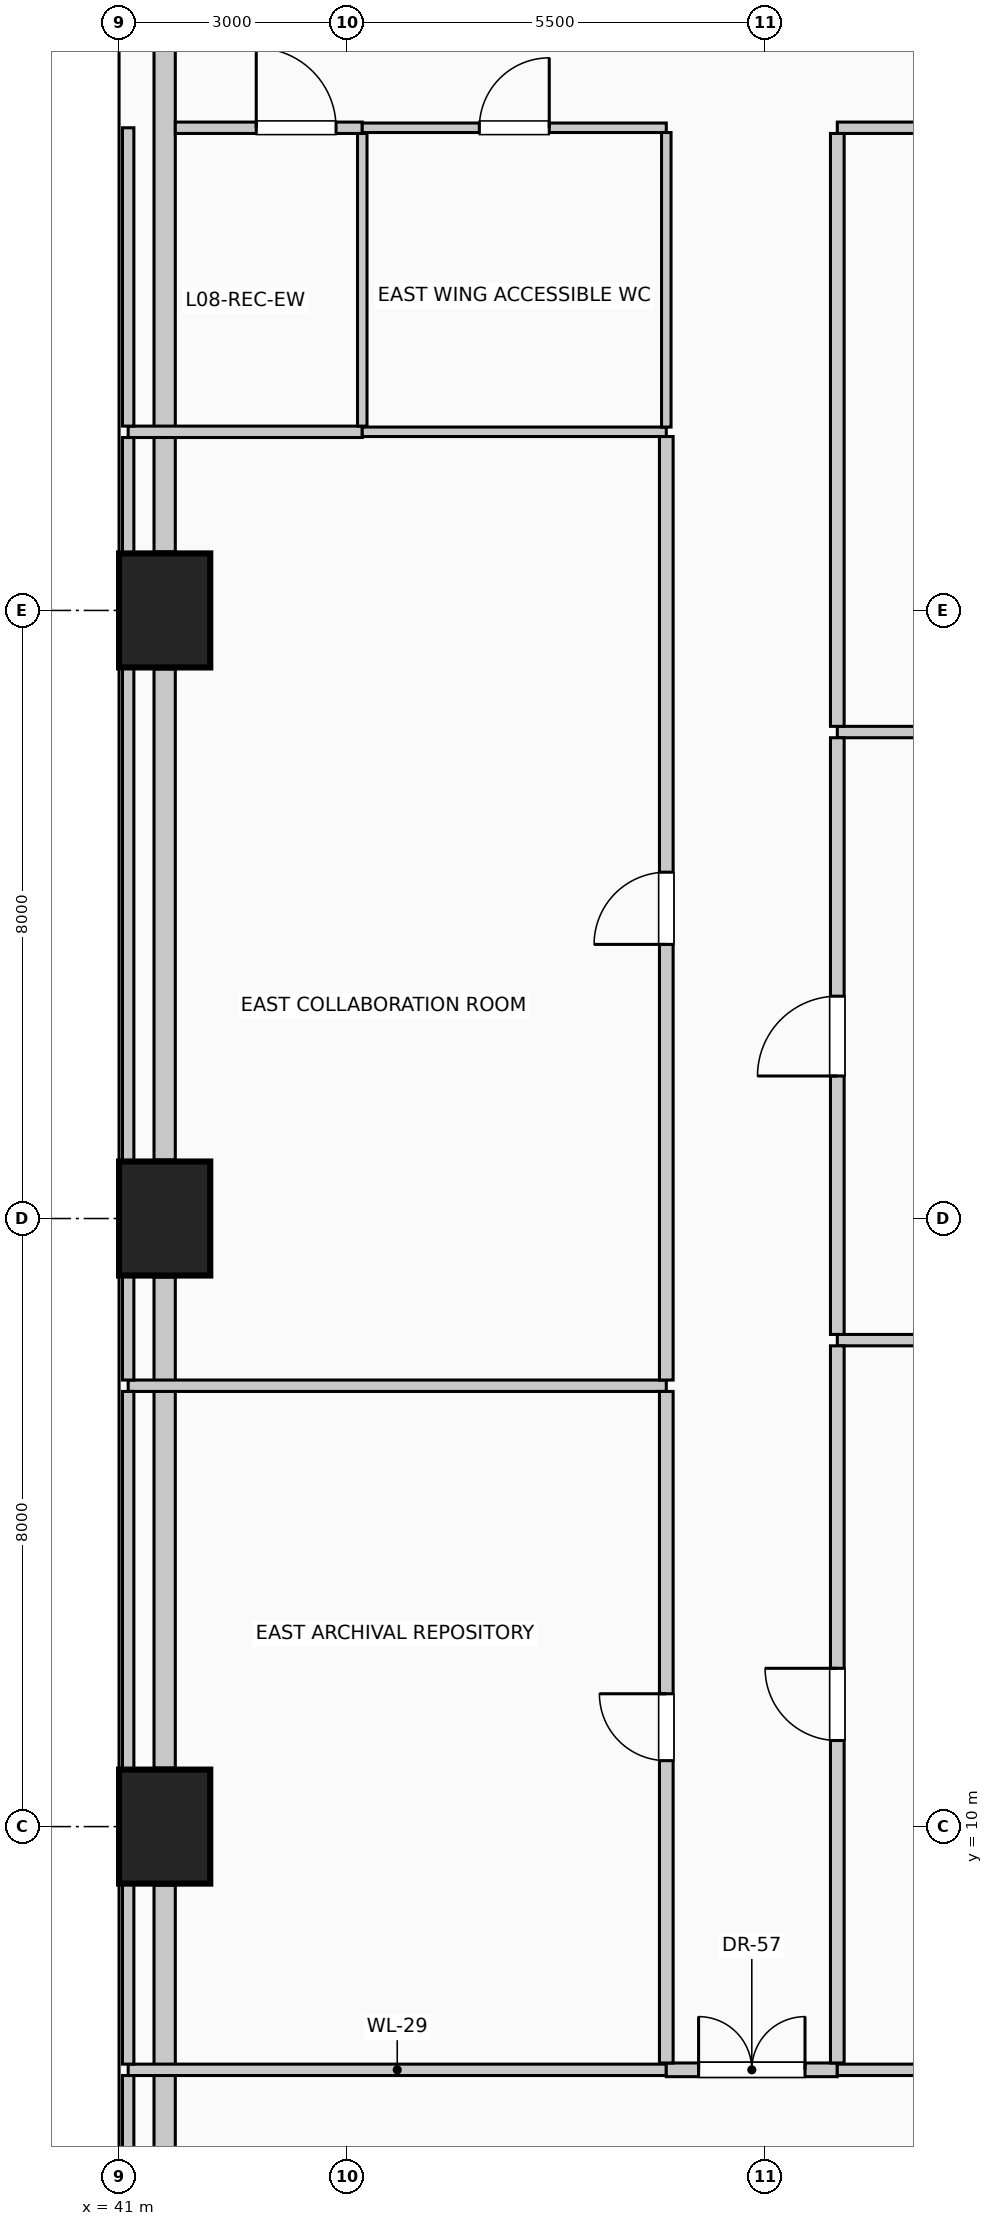
"""IFC4 building model, lengths in metres.
Left out: names, types, materials, properties, quantities, classifications, styles, units other than length and angle.
Written with IfcOpenShell. Run it as: python <this file> out.ifc"""

import sys

from ifc_helpers import new_model, si_unit, direction, frame, frame_2d, origin, origin_2d, place, context, subcontext, project, spatial, rectangle, extrude, element, fill, save


model = new_model("IFC4")
c1 = context("Model", 3, precision=1e-05, world=origin(), true_north=direction((0.0, 1.0)))
c2 = subcontext(c1, "Body", "Model", "MODEL_VIEW")
j1 = project(units=[si_unit("LENGTHUNIT", "METRE"), si_unit("PLANEANGLEUNIT", "RADIAN")], contexts=[c1])
p1 = place(None, origin())
s1 = spatial("IfcSite", under=j1, at=p1, CompositionType="ELEMENT")
p2 = place(p1, origin())
s2 = spatial("IfcBuilding", under=s1, at=p2, CompositionType="ELEMENT")
p3 = place(p2, frame((0.0, 0.0, 34.6)))
s3 = spatial("IfcBuildingStorey", under=s2, at=p3, CompositionType="ELEMENT", Elevation=34.6)
for number, where, z_axis, x_axis in (
    (1, (41.6, 10.0, 0.0), (0.0, 0.0, 1.0), (1.0, 0.0, 0.0)),
    (2, (41.6, 18.0, 0.0), (0.0, 0.0, 1.0), (1.0, 0.0, 0.0)),
    (3, (41.6, 26.0, 0.0), (0.0, 0.0, 1.0), (1.0, 0.0, 0.0)),
):
    element("IfcColumn", number, at=place(p3, frame(where, z_axis=z_axis, x_axis=x_axis)), inside=s3, PredefinedType="COLUMN", context=c2, shape_type="SweptSolid", body=[
        extrude(rectangle(XDim=1.2, YDim=1.5, at=origin_2d()), origin(), (0.0, 0.0, 1.0), 4.0),
    ])
p4 = place(p3, frame((41.6, 1.37, 0.0), z_axis=(0.0, 0.0, 1.0), x_axis=(0.0, 1.0, 0.0)))
e4 = element("IfcWall", 4, at=p4, inside=s3, PredefinedType="SOLIDWALL", context=c2, shape_type="SweptSolid", body=[
    extrude(rectangle(XDim=7.86, YDim=0.28, at=frame_2d((3.93, 0.0))), origin(), (0.0, 0.0, 1.0), 3.0),
])
p5 = place(p4, frame((1.153, 0.0, 0.42)))
e5 = element("IfcOpeningElement", 5, at=p5, cuts=e4, PredefinedType="OPENING", context=c2, shape_type="SweptSolid", body=[
    extrude(rectangle(XDim=2.2, YDim=1.95, at=frame_2d((1.1, 0.975))), frame((0.0, 0.15, 0.0), z_axis=(0.0, -1.0, 0.0), x_axis=(1.0, 0.0, 0.0)), (0.0, 0.0, 1.0), 0.3),
])
for number, where, z_axis, x_axis in (
    (6, (41.6, 10.77, 0.0), (0.0, 0.0, 1.0), (0.0, 1.0, 0.0)),
    (7, (41.6, 18.77, 0.0), (0.0, 0.0, 1.0), (0.0, 1.0, 0.0)),
):
    element("IfcWall", number, at=place(p3, frame(where, z_axis=z_axis, x_axis=x_axis)), inside=s3, PredefinedType="SOLIDWALL", context=c2, shape_type="SweptSolid", body=[
        extrude(rectangle(XDim=6.46, YDim=0.28, at=frame_2d((3.23, 0.0))), origin(), (0.0, 0.0, 1.0), 3.0),
    ])
p6 = place(p3, frame((41.6, 26.77, 0.0), z_axis=(0.0, 0.0, 1.0), x_axis=(0.0, 1.0, 0.0)))
e8 = element("IfcWall", 8, at=p6, inside=s3, PredefinedType="SOLIDWALL", context=c2, shape_type="SweptSolid", body=[
    extrude(rectangle(XDim=6.71, YDim=0.28, at=frame_2d((3.355, 0.0))), origin(), (0.0, 0.0, 1.0), 3.0),
])
p7 = place(p3, frame((41.12, 6.8, 0.0), z_axis=(0.0, 0.0, 1.0), x_axis=(1.0, 0.0, 0.0)))
e9 = element("IfcWall", 9, at=p7, inside=s3, PredefinedType="PARTITIONING", context=c2, shape_type="SweptSolid", body=[
    extrude(rectangle(XDim=7.08, YDim=0.15, at=frame_2d((3.54, 0.0))), origin(), (0.0, 0.0, 1.0), 3.095),
])
p8 = place(p3, frame((48.2, 6.8, 0.0), z_axis=(0.0, 0.0, 1.0), x_axis=(1.0, 0.0, 0.0)))
e10 = element("IfcWall", 10, at=p8, inside=s3, PredefinedType="PARTITIONING", context=c2, shape_type="SweptSolid", body=[
    extrude(rectangle(XDim=2.25, YDim=0.18, at=frame_2d((1.125, 0.0))), origin(), (0.0, 0.0, 1.0), 3.095),
])
p9 = place(p8, frame((0.425, 0.0, 0.0)))
e11 = element("IfcOpeningElement", 11, at=p9, cuts=e10, PredefinedType="OPENING", context=c2, shape_type="SweptSolid", body=[
    extrude(rectangle(XDim=1.4, YDim=2.2, at=frame_2d((0.7, 1.1))), frame((0.0, 0.1, 0.0), z_axis=(0.0, -1.0, 0.0), x_axis=(1.0, 0.0, 0.0)), (0.0, 0.0, 1.0), 0.2),
])
p10 = place(p3, frame((50.45, 6.8, 0.0), z_axis=(0.0, 0.0, 1.0), x_axis=(1.0, 0.0, 0.0)))
e12 = element("IfcWall", 12, at=p10, inside=s3, PredefinedType="PARTITIONING", context=c2, shape_type="SweptSolid", body=[
    extrude(rectangle(XDim=6.81, YDim=0.15, at=frame_2d((3.405, 0.0))), origin(), (0.0, 0.0, 1.0), 3.095),
])
p11 = place(p3, frame((41.12, 15.8, 0.0), z_axis=(0.0, 0.0, 1.0), x_axis=(1.0, 0.0, 0.0)))
e13 = element("IfcWall", 13, at=p11, inside=s3, PredefinedType="PARTITIONING", context=c2, shape_type="SweptSolid", body=[
    extrude(rectangle(XDim=7.08, YDim=0.15, at=frame_2d((3.54, 0.0))), origin(), (0.0, 0.0, 1.0), 3.7),
])
for number, where, z_axis, x_axis in (
    (14, (50.45, 16.4, 0.0), (0.0, 0.0, 1.0), (1.0, 0.0, 0.0)),
    (15, (50.45, 24.4, 0.0), (0.0, 0.0, 1.0), (1.0, 0.0, 0.0)),
):
    element("IfcWall", number, at=place(p3, frame(where, z_axis=z_axis, x_axis=x_axis)), inside=s3, PredefinedType="PARTITIONING", context=c2, shape_type="SweptSolid", body=[
        extrude(rectangle(XDim=6.81, YDim=0.15, at=frame_2d((3.405, 0.0))), origin(), (0.0, 0.0, 1.0), 3.7),
    ])
p12 = place(p3, frame((41.12, 28.35, 0.0), z_axis=(0.0, 0.0, 1.0), x_axis=(1.0, 0.0, 0.0)))
e16 = element("IfcWall", 16, at=p12, inside=s3, PredefinedType="PARTITIONING", context=c2, shape_type="SweptSolid", body=[
    extrude(rectangle(XDim=3.08, YDim=0.15, at=frame_2d((1.54, 0.0))), origin(), (0.0, 0.0, 1.0), 3.7),
])
p13 = place(p3, frame((44.2, 28.35, 0.0), z_axis=(0.0, 0.0, 1.0), x_axis=(1.0, 0.0, 0.0)))
e17 = element("IfcWall", 17, at=p13, inside=s3, PredefinedType="PARTITIONING", context=c2, shape_type="SweptSolid", body=[
    extrude(rectangle(XDim=4.0, YDim=0.125, at=frame_2d((2.0, 0.0))), origin(), (0.0, 0.0, 1.0), 3.7),
])
p14 = place(p3, frame((41.74, 32.35, 0.0), z_axis=(0.0, 0.0, 1.0), x_axis=(1.0, 0.0, 0.0)))
e18 = element("IfcWall", 18, at=p14, inside=s3, PredefinedType="PARTITIONING", context=c2, shape_type="SweptSolid", body=[
    extrude(rectangle(XDim=2.46, YDim=0.15, at=frame_2d((1.23, 0.0))), origin(), (0.0, 0.0, 1.0), 3.7),
])
p15 = place(p14, frame((1.065, 0.0, 0.0)))
e19 = element("IfcOpeningElement", 19, at=p15, cuts=e18, PredefinedType="OPENING", context=c2, shape_type="SweptSolid", body=[
    extrude(rectangle(XDim=1.05, YDim=2.15, at=frame_2d((0.525, 1.075))), frame((0.0, 0.085, 0.0), z_axis=(0.0, -1.0, 0.0), x_axis=(1.0, 0.0, 0.0)), (0.0, 0.0, 1.0), 0.17),
])
p16 = place(p3, frame((44.2, 32.35, 0.0), z_axis=(0.0, 0.0, 1.0), x_axis=(1.0, 0.0, 0.0)))
e20 = element("IfcWall", 20, at=p16, inside=s3, PredefinedType="PARTITIONING", context=c2, shape_type="SweptSolid", body=[
    extrude(rectangle(XDim=4.0, YDim=0.125, at=frame_2d((2.0, 0.0))), origin(), (0.0, 0.0, 1.0), 3.7),
])
p17 = place(p16, frame((1.54, 0.0, 0.0)))
e21 = element("IfcOpeningElement", 21, at=p17, cuts=e20, PredefinedType="OPENING", context=c2, shape_type="SweptSolid", body=[
    extrude(rectangle(XDim=0.92, YDim=2.1, at=frame_2d((0.46, 1.05))), frame((0.0, 0.073, 0.0), z_axis=(0.0, -1.0, 0.0), x_axis=(1.0, 0.0, 0.0)), (0.0, 0.0, 1.0), 0.145),
])
p18 = place(p3, frame((50.45, 32.35, 0.0), z_axis=(0.0, 0.0, 1.0), x_axis=(1.0, 0.0, 0.0)))
e22 = element("IfcWall", 22, at=p18, inside=s3, PredefinedType="PARTITIONING", context=c2, shape_type="SweptSolid", body=[
    extrude(rectangle(XDim=4.0, YDim=0.15, at=frame_2d((2.0, 0.0))), origin(), (0.0, 0.0, 1.0), 3.7),
])
p19 = place(p18, frame((1.475, 0.0, 0.0)))
e23 = element("IfcOpeningElement", 23, at=p19, cuts=e22, PredefinedType="OPENING", context=c2, shape_type="SweptSolid", body=[
    extrude(rectangle(XDim=1.05, YDim=2.15, at=frame_2d((0.525, 1.075))), frame((0.0, 0.085, 0.0), z_axis=(0.0, -1.0, 0.0), x_axis=(1.0, 0.0, 0.0)), (0.0, 0.0, 1.0), 0.17),
])
p20 = place(p3, frame((41.12, 1.35, 0.0), z_axis=(0.0, 0.0, 1.0), x_axis=(0.0, 1.0, 0.0)))
e24 = element("IfcWall", 24, at=p20, inside=s3, PredefinedType="PARTITIONING", context=c2, shape_type="SweptSolid", body=[
    extrude(rectangle(XDim=5.375, YDim=0.15, at=frame_2d((2.688, 0.0))), origin(), (0.0, 0.0, 1.0), 3.7),
])
p21 = place(p3, frame((41.12, 6.875, 0.0), z_axis=(0.0, 0.0, 1.0), x_axis=(0.0, 1.0, 0.0)))
e25 = element("IfcWall", 25, at=p21, inside=s3, PredefinedType="PARTITIONING", context=c2, shape_type="SweptSolid", body=[
    extrude(rectangle(XDim=2.375, YDim=0.15, at=frame_2d((1.188, 0.0))), origin(), (0.0, 0.0, 1.0), 3.7),
])
p22 = place(p3, frame((41.12, 10.75, 0.0), z_axis=(0.0, 0.0, 1.0), x_axis=(0.0, 1.0, 0.0)))
e26 = element("IfcWall", 26, at=p22, inside=s3, PredefinedType="PARTITIONING", context=c2, shape_type="SweptSolid", body=[
    extrude(rectangle(XDim=4.975, YDim=0.15, at=frame_2d((2.488, 0.0))), origin(), (0.0, 0.0, 1.0), 3.7),
])
p23 = place(p3, frame((41.12, 15.875, 0.0), z_axis=(0.0, 0.0, 1.0), x_axis=(0.0, 1.0, 0.0)))
e27 = element("IfcWall", 27, at=p23, inside=s3, PredefinedType="PARTITIONING", context=c2, shape_type="SweptSolid", body=[
    extrude(rectangle(XDim=1.375, YDim=0.15, at=frame_2d((0.688, 0.0))), origin(), (0.0, 0.0, 1.0), 3.7),
])
p24 = place(p3, frame((41.12, 18.75, 0.0), z_axis=(0.0, 0.0, 1.0), x_axis=(0.0, 1.0, 0.0)))
e28 = element("IfcWall", 28, at=p24, inside=s3, PredefinedType="PARTITIONING", context=c2, shape_type="SweptSolid", body=[
    extrude(rectangle(XDim=6.5, YDim=0.15, at=frame_2d((3.25, 0.0))), origin(), (0.0, 0.0, 1.0), 3.7),
])
p25 = place(p3, frame((41.12, 26.75, 0.0), z_axis=(0.0, 0.0, 1.0), x_axis=(0.0, 1.0, 0.0)))
e29 = element("IfcWall", 29, at=p25, inside=s3, PredefinedType="PARTITIONING", context=c2, shape_type="SweptSolid", body=[
    extrude(rectangle(XDim=1.525, YDim=0.15, at=frame_2d((0.762, 0.0))), origin(), (0.0, 0.0, 1.0), 3.7),
])
p26 = place(p3, frame((41.12, 28.425, 0.0), z_axis=(0.0, 0.0, 1.0), x_axis=(0.0, 1.0, 0.0)))
e30 = element("IfcWall", 30, at=p26, inside=s3, PredefinedType="PARTITIONING", context=c2, shape_type="SweptSolid", body=[
    extrude(rectangle(XDim=3.925, YDim=0.15, at=frame_2d((1.962, 0.0))), origin(), (0.0, 0.0, 1.0), 3.7),
])
p27 = place(p3, frame((44.2, 28.425, 0.0), z_axis=(0.0, 0.0, 1.0), x_axis=(0.0, 1.0, 0.0)))
e31 = element("IfcWall", 31, at=p27, inside=s3, PredefinedType="PARTITIONING", context=c2, shape_type="SweptSolid", body=[
    extrude(rectangle(XDim=3.85, YDim=0.125, at=frame_2d((1.925, 0.0))), origin(), (0.0, 0.0, 1.0), 3.7),
])
p28 = place(p3, frame((48.2, 6.89, 0.0), z_axis=(0.0, 0.0, 1.0), x_axis=(0.0, 1.0, 0.0)))
e32 = element("IfcWall", 32, at=p28, inside=s3, PredefinedType="PARTITIONING", context=c2, shape_type="SweptSolid", body=[
    extrude(rectangle(XDim=8.835, YDim=0.18, at=frame_2d((4.417, 0.0))), origin(), (0.0, 0.0, 1.0), 3.7),
])
p29 = place(p28, frame((3.978, 0.0, 0.0)))
e33 = element("IfcOpeningElement", 33, at=p29, cuts=e32, PredefinedType="OPENING", context=c2, shape_type="SweptSolid", body=[
    extrude(rectangle(XDim=0.88, YDim=2.1, at=frame_2d((0.44, 1.05))), frame((0.0, 0.1, 0.0), z_axis=(0.0, -1.0, 0.0), x_axis=(1.0, 0.0, 0.0)), (0.0, 0.0, 1.0), 0.2),
])
p30 = place(p3, frame((48.2, 15.875, 0.0), z_axis=(0.0, 0.0, 1.0), x_axis=(0.0, 1.0, 0.0)))
e34 = element("IfcWall", 34, at=p30, inside=s3, PredefinedType="PARTITIONING", context=c2, shape_type="SweptSolid", body=[
    extrude(rectangle(XDim=12.413, YDim=0.18, at=frame_2d((6.206, 0.0))), origin(), (0.0, 0.0, 1.0), 3.7),
])
p31 = place(p30, frame((5.731, 0.0, 0.0)))
e35 = element("IfcOpeningElement", 35, at=p31, cuts=e34, PredefinedType="OPENING", context=c2, shape_type="SweptSolid", body=[
    extrude(rectangle(XDim=0.95, YDim=2.15, at=frame_2d((0.475, 1.075))), frame((0.0, 0.1, 0.0), z_axis=(0.0, -1.0, 0.0), x_axis=(1.0, 0.0, 0.0)), (0.0, 0.0, 1.0), 0.2),
])
p32 = place(p3, frame((48.2, 28.413, 0.0), z_axis=(0.0, 0.0, 1.0), x_axis=(0.0, 1.0, 0.0)))
e36 = element("IfcWall", 36, at=p32, inside=s3, PredefinedType="PARTITIONING", context=c2, shape_type="SweptSolid", body=[
    extrude(rectangle(XDim=3.875, YDim=0.125, at=frame_2d((1.938, 0.0))), origin(), (0.0, 0.0, 1.0), 3.7),
])
p33 = place(p3, frame((50.45, 6.89, 0.0), z_axis=(0.0, 0.0, 1.0), x_axis=(0.0, 1.0, 0.0)))
e37 = element("IfcWall", 37, at=p33, inside=s3, PredefinedType="PARTITIONING", context=c2, shape_type="SweptSolid", body=[
    extrude(rectangle(XDim=9.435, YDim=0.18, at=frame_2d((4.718, 0.0))), origin(), (0.0, 0.0, 1.0), 3.7),
])
p34 = place(p33, frame((4.242, 0.0, 0.0)))
e38 = element("IfcOpeningElement", 38, at=p34, cuts=e37, PredefinedType="OPENING", context=c2, shape_type="SweptSolid", body=[
    extrude(rectangle(XDim=0.95, YDim=2.15, at=frame_2d((0.475, 1.075))), frame((0.0, 0.1, 0.0), z_axis=(0.0, -1.0, 0.0), x_axis=(1.0, 0.0, 0.0)), (0.0, 0.0, 1.0), 0.2),
])
p35 = place(p3, frame((50.45, 16.475, 0.0), z_axis=(0.0, 0.0, 1.0), x_axis=(0.0, 1.0, 0.0)))
e39 = element("IfcWall", 39, at=p35, inside=s3, PredefinedType="PARTITIONING", context=c2, shape_type="SweptSolid", body=[
    extrude(rectangle(XDim=7.85, YDim=0.18, at=frame_2d((3.925, 0.0))), origin(), (0.0, 0.0, 1.0), 3.7),
])
p36 = place(p35, frame((3.4, 0.0, 0.0)))
e40 = element("IfcOpeningElement", 40, at=p36, cuts=e39, PredefinedType="OPENING", context=c2, shape_type="SweptSolid", body=[
    extrude(rectangle(XDim=1.05, YDim=2.15, at=frame_2d((0.525, 1.075))), frame((0.0, 0.1, 0.0), z_axis=(0.0, -1.0, 0.0), x_axis=(1.0, 0.0, 0.0)), (0.0, 0.0, 1.0), 0.2),
])
p37 = place(p3, frame((50.45, 24.475, 0.0), z_axis=(0.0, 0.0, 1.0), x_axis=(0.0, 1.0, 0.0)))
e41 = element("IfcWall", 41, at=p37, inside=s3, PredefinedType="PARTITIONING", context=c2, shape_type="SweptSolid", body=[
    extrude(rectangle(XDim=7.8, YDim=0.18, at=frame_2d((3.9, 0.0))), origin(), (0.0, 0.0, 1.0), 3.7),
])
p38 = place(p9, origin())
e42 = element("IfcDoor", 42, at=p38, inside=s3, OperationType="DOUBLE_DOOR_SINGLE_SWING", PredefinedType="DOOR", context=c2, shape_type="SweptSolid", body=[
    extrude(rectangle(XDim=1.4, YDim=2.2, at=frame_2d((0.7, 1.1))), frame((0.0, 0.025, 0.0), z_axis=(0.0, -1.0, 0.0), x_axis=(1.0, 0.0, 0.0)), (0.0, 0.0, 1.0), 0.05),
])
fill(e11, e42)
p39 = place(p15, origin())
e43 = element("IfcDoor", 43, at=p39, inside=s3, OperationType="SINGLE_SWING_LEFT", PredefinedType="DOOR", context=c2, shape_type="SweptSolid", body=[
    extrude(rectangle(XDim=1.05, YDim=2.15, at=frame_2d((0.525, 1.075))), frame((0.0, 0.025, 0.0), z_axis=(0.0, -1.0, 0.0), x_axis=(1.0, 0.0, 0.0)), (0.0, 0.0, 1.0), 0.05),
])
fill(e19, e43)
p40 = place(p17, origin())
e44 = element("IfcDoor", 44, at=p40, inside=s3, OperationType="SINGLE_SWING_RIGHT", PredefinedType="DOOR", context=c2, shape_type="SweptSolid", body=[
    extrude(rectangle(XDim=0.92, YDim=2.1, at=frame_2d((0.46, 1.05))), frame((0.0, 0.025, 0.0), z_axis=(0.0, -1.0, 0.0), x_axis=(1.0, 0.0, 0.0)), (0.0, 0.0, 1.0), 0.05),
])
fill(e21, e44)
p41 = place(p29, origin())
e45 = element("IfcDoor", 45, at=p41, inside=s3, OperationType="SINGLE_SWING_RIGHT", PredefinedType="DOOR", context=c2, shape_type="SweptSolid", body=[
    extrude(rectangle(XDim=0.88, YDim=2.1, at=frame_2d((0.44, 1.05))), frame((0.0, 0.025, 0.0), z_axis=(0.0, -1.0, 0.0), x_axis=(1.0, 0.0, 0.0)), (0.0, 0.0, 1.0), 0.05),
])
fill(e33, e45)
p42 = place(p31, origin())
e46 = element("IfcDoor", 46, at=p42, inside=s3, OperationType="SINGLE_SWING_LEFT", PredefinedType="DOOR", context=c2, shape_type="SweptSolid", body=[
    extrude(rectangle(XDim=0.95, YDim=2.15, at=frame_2d((0.475, 1.075))), frame((0.0, 0.025, 0.0), z_axis=(0.0, -1.0, 0.0), x_axis=(1.0, 0.0, 0.0)), (0.0, 0.0, 1.0), 0.05),
])
fill(e35, e46)
p43 = place(p34, origin())
e47 = element("IfcDoor", 47, at=p43, inside=s3, OperationType="SINGLE_SWING_RIGHT", PredefinedType="DOOR", context=c2, shape_type="SweptSolid", body=[
    extrude(rectangle(XDim=0.95, YDim=2.15, at=frame_2d((0.475, 1.075))), frame((0.0, 0.025, 0.0), z_axis=(0.0, -1.0, 0.0), x_axis=(1.0, 0.0, 0.0)), (0.0, 0.0, 1.0), 0.05),
])
fill(e38, e47)
p44 = place(p36, origin())
e48 = element("IfcDoor", 48, at=p44, inside=s3, OperationType="SINGLE_SWING_LEFT", PredefinedType="DOOR", context=c2, shape_type="SweptSolid", body=[
    extrude(rectangle(XDim=1.05, YDim=2.15, at=frame_2d((0.525, 1.075))), frame((0.0, 0.025, 0.0), z_axis=(0.0, -1.0, 0.0), x_axis=(1.0, 0.0, 0.0)), (0.0, 0.0, 1.0), 0.05),
])
fill(e40, e48)
save(model, sys.argv[1])
